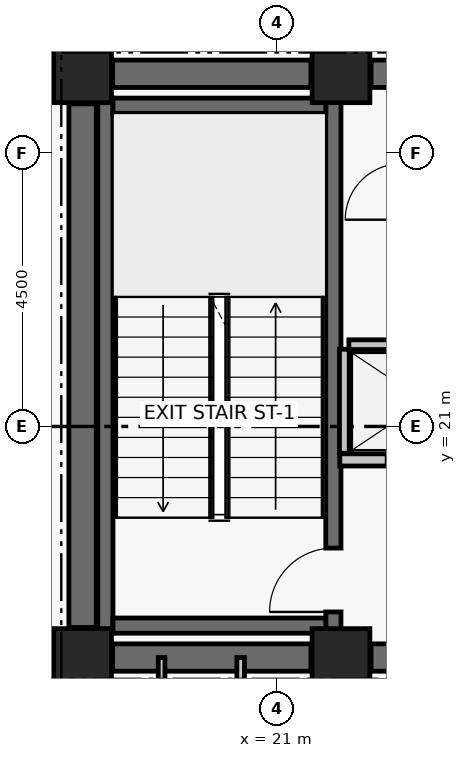
"""IFC4 building model, lengths in metres.
Left out: names, types, materials, properties, quantities, classifications, styles, units other than length and angle.
Written with IfcOpenShell. Run it as: python <this file> out.ifc"""

import sys

from ifc_helpers import new_model, si_unit, direction, frame, frame_2d, origin, origin_2d, place, context, subcontext, project, spatial, rectangle, extrude, element, fill, save


model = new_model("IFC4")
c1 = context("Model", 3, precision=1e-05, world=origin(), true_north=direction((0.0, 1.0)))
c2 = subcontext(c1, "Body", "Model", "MODEL_VIEW")
j1 = project(units=[si_unit("LENGTHUNIT", "METRE"), si_unit("PLANEANGLEUNIT", "RADIAN")], contexts=[c1])
p1 = place(None, origin())
s1 = spatial("IfcSite", under=j1, at=p1, CompositionType="ELEMENT")
p2 = place(p1, origin())
s2 = spatial("IfcBuilding", under=s1, at=p2, CompositionType="ELEMENT")
p3 = place(p2, frame((0.0, 0.0, 291.78)))
s3 = spatial("IfcBuildingStorey", under=s2, at=p3, CompositionType="ELEMENT", Elevation=291.78)
for number, where, z_axis, x_axis in (
    (1, (17.8, 17.2, 0.0), (0.0, 0.0, 1.0), (1.0, 0.0, 0.0)),
    (2, (22.05, 17.2, 0.0), (0.0, 0.0, 1.0), (1.0, 0.0, 0.0)),
    (3, (17.8, 26.8, 0.0), (0.0, 0.0, 1.0), (1.0, 0.0, 0.0)),
    (4, (22.05, 26.8, 0.0), (0.0, 0.0, 1.0), (1.0, 0.0, 0.0)),
):
    element("IfcColumn", number, at=place(p3, frame(where, z_axis=z_axis, x_axis=x_axis)), inside=s3, PredefinedType="COLUMN", context=c2, shape_type="SweptSolid", body=[
        extrude(rectangle(XDim=0.95, YDim=0.95, at=origin_2d()), origin(), (0.0, 0.0, 1.0), 3.72),
    ])
p4 = place(p3, frame((18.295, 17.2, 0.0), z_axis=(0.0, 0.0, 1.0), x_axis=(1.0, 0.0, 0.0)))
e5 = element("IfcWall", 5, at=p4, inside=s3, PredefinedType="SHEAR", context=c2, shape_type="SweptSolid", body=[
    extrude(rectangle(XDim=3.26, YDim=0.45, at=frame_2d((1.63, 0.0))), origin(), (0.0, 0.0, 1.0), 3.5),
])
p5 = place(p3, frame((22.545, 17.2, 0.0), z_axis=(0.0, 0.0, 1.0), x_axis=(1.0, 0.0, 0.0)))
e6 = element("IfcWall", 6, at=p5, inside=s3, PredefinedType="SHEAR", context=c2, shape_type="SweptSolid", body=[
    extrude(rectangle(XDim=1.805, YDim=0.45, at=frame_2d((0.903, 0.0))), origin(), (0.0, 0.0, 1.0), 3.5),
])
p6 = place(p3, frame((18.295, 26.8, 0.0), z_axis=(0.0, 0.0, 1.0), x_axis=(1.0, 0.0, 0.0)))
e7 = element("IfcWall", 7, at=p6, inside=s3, PredefinedType="SHEAR", context=c2, shape_type="SweptSolid", body=[
    extrude(rectangle(XDim=3.26, YDim=0.45, at=frame_2d((1.63, 0.0))), origin(), (0.0, 0.0, 1.0), 3.5),
])
p7 = place(p3, frame((22.545, 26.8, 0.0), z_axis=(0.0, 0.0, 1.0), x_axis=(1.0, 0.0, 0.0)))
e8 = element("IfcWall", 8, at=p7, inside=s3, PredefinedType="SHEAR", context=c2, shape_type="SweptSolid", body=[
    extrude(rectangle(XDim=1.805, YDim=0.45, at=frame_2d((0.903, 0.0))), origin(), (0.0, 0.0, 1.0), 3.5),
])
p8 = place(p3, frame((17.8, 17.695, 0.0), z_axis=(0.0, 0.0, 1.0), x_axis=(0.0, 1.0, 0.0)))
e9 = element("IfcWall", 9, at=p8, inside=s3, PredefinedType="SHEAR", context=c2, shape_type="SweptSolid", body=[
    extrude(rectangle(XDim=8.61, YDim=0.45, at=frame_2d((4.305, 0.0))), origin(), (0.0, 0.0, 1.0), 3.5),
])
p9 = place(p3, frame((18.175, 17.6, 0.0), z_axis=(0.0, 0.0, 1.0), x_axis=(0.0, 1.0, 0.0)))
e10 = element("IfcWall", 10, at=p9, inside=s3, PredefinedType="SHEAR", context=c2, shape_type="SweptSolid", body=[
    extrude(rectangle(XDim=8.8, YDim=0.25, at=frame_2d((4.4, 0.0))), origin(), (0.0, 0.0, 1.0), 3.5),
])
p10 = place(p3, frame((21.925, 17.6, 0.0), z_axis=(0.0, 0.0, 1.0), x_axis=(0.0, 1.0, 0.0)))
e11 = element("IfcWall", 11, at=p10, inside=s3, PredefinedType="SHEAR", context=c2, shape_type="SweptSolid", body=[
    extrude(rectangle(XDim=8.8, YDim=0.25, at=frame_2d((4.4, 0.0))), origin(), (0.0, 0.0, 1.0), 3.5),
])
p11 = place(p10, frame((0.35, 0.0, 0.0)))
e12 = element("IfcOpeningElement", 12, at=p11, cuts=e11, PredefinedType="OPENING", context=c2, shape_type="SweptSolid", body=[
    extrude(rectangle(XDim=1.05, YDim=2.08, at=frame_2d((0.525, 1.04))), frame((0.0, 0.135, 0.0), z_axis=(0.0, -1.0, 0.0), x_axis=(1.0, 0.0, 0.0)), (0.0, 0.0, 1.0), 0.27),
])
for number, where, z_axis, x_axis in (
    (13, (18.3, 17.725, 0.0), (0.0, 0.0, 1.0), (1.0, 0.0, 0.0)),
    (14, (18.3, 26.275, 0.0), (0.0, 0.0, 1.0), (1.0, 0.0, 0.0)),
):
    element("IfcWall", number, at=place(p3, frame(where, z_axis=z_axis, x_axis=x_axis)), inside=s3, PredefinedType="SHEAR", context=c2, shape_type="SweptSolid", body=[
        extrude(rectangle(XDim=3.5, YDim=0.25, at=frame_2d((1.75, 0.0))), origin(), (0.0, 0.0, 1.0), 3.5),
    ])
p12 = place(p3, frame((22.03, 20.45, 0.0), z_axis=(0.0, 0.0, 1.0), x_axis=(1.0, 0.0, 0.0)))
e15 = element("IfcWall", 15, at=p12, inside=s3, PredefinedType="PARTITIONING", context=c2, shape_type="SweptSolid", body=[
    extrude(rectangle(XDim=2.8, YDim=0.2, at=frame_2d((1.4, 0.0))), origin(), (0.0, 0.0, 1.0), 3.5),
])
p13 = place(p12, frame((0.78, 0.0, 0.0)))
e16 = element("IfcOpeningElement", 16, at=p13, cuts=e15, PredefinedType="OPENING", context=c2, shape_type="SweptSolid", body=[
    extrude(rectangle(XDim=1.1, YDim=2.08, at=frame_2d((0.55, 1.04))), frame((0.0, 0.11, 0.0), z_axis=(0.0, -1.0, 0.0), x_axis=(1.0, 0.0, 0.0)), (0.0, 0.0, 1.0), 0.22),
])
p14 = place(p3, frame((22.105, 20.56, 0.0), z_axis=(0.0, 0.0, 1.0), x_axis=(0.0, 1.0, 0.0)))
e17 = element("IfcWall", 17, at=p14, inside=s3, PredefinedType="PARTITIONING", context=c2, shape_type="SweptSolid", body=[
    extrude(rectangle(XDim=1.71, YDim=0.16, at=frame_2d((0.855, 0.0))), origin(), (0.0, 0.0, 1.0), 3.5),
])
p15 = place(p3, frame((22.18, 22.345, 0.0), z_axis=(0.0, 0.0, 1.0), x_axis=(1.0, 0.0, 0.0)))
e18 = element("IfcWall", 18, at=p15, inside=s3, PredefinedType="PARTITIONING", context=c2, shape_type="SweptSolid", body=[
    extrude(rectangle(XDim=2.65, YDim=0.16, at=frame_2d((1.325, 0.0))), origin(), (0.0, 0.0, 1.0), 3.5),
])
p16 = place(p3, frame((19.1, 14.95, 0.0), z_axis=(0.0, 0.0, 1.0), x_axis=(0.0, 1.0, 0.0)))
e19 = element("IfcWall", 19, at=p16, inside=s3, PredefinedType="PARTITIONING", context=c2, shape_type="SweptSolid", body=[
    extrude(rectangle(XDim=2.25, YDim=0.11, at=frame_2d((1.125, 0.0))), origin(), (0.0, 0.0, 1.0), 2.63),
])
for number, where, z_axis, x_axis in (
    (20, (20.4, 14.95, 0.0), (0.0, 0.0, 1.0), (0.0, 1.0, 0.0)),
    (21, (22.36, 14.95, 0.0), (0.0, 0.0, 1.0), (0.0, 1.0, 0.0)),
):
    element("IfcWall", number, at=place(p3, frame(where, z_axis=z_axis, x_axis=x_axis)), inside=s3, PredefinedType="PARTITIONING", context=c2, shape_type="SweptSolid", body=[
        extrude(rectangle(XDim=2.25, YDim=0.125, at=frame_2d((1.125, 0.0))), origin(), (0.0, 0.0, 1.0), 2.63),
    ])
p17 = place(p11, origin())
e22 = element("IfcDoor", 22, at=p17, inside=s3, OperationType="SINGLE_SWING_LEFT", PredefinedType="DOOR", context=c2, shape_type="SweptSolid", body=[
    extrude(rectangle(XDim=1.05, YDim=2.08, at=frame_2d((0.525, 1.04))), frame((0.0, 0.025, 0.0), z_axis=(0.0, -1.0, 0.0), x_axis=(1.0, 0.0, 0.0)), (0.0, 0.0, 1.0), 0.05),
])
fill(e12, e22)
save(model, sys.argv[1])
